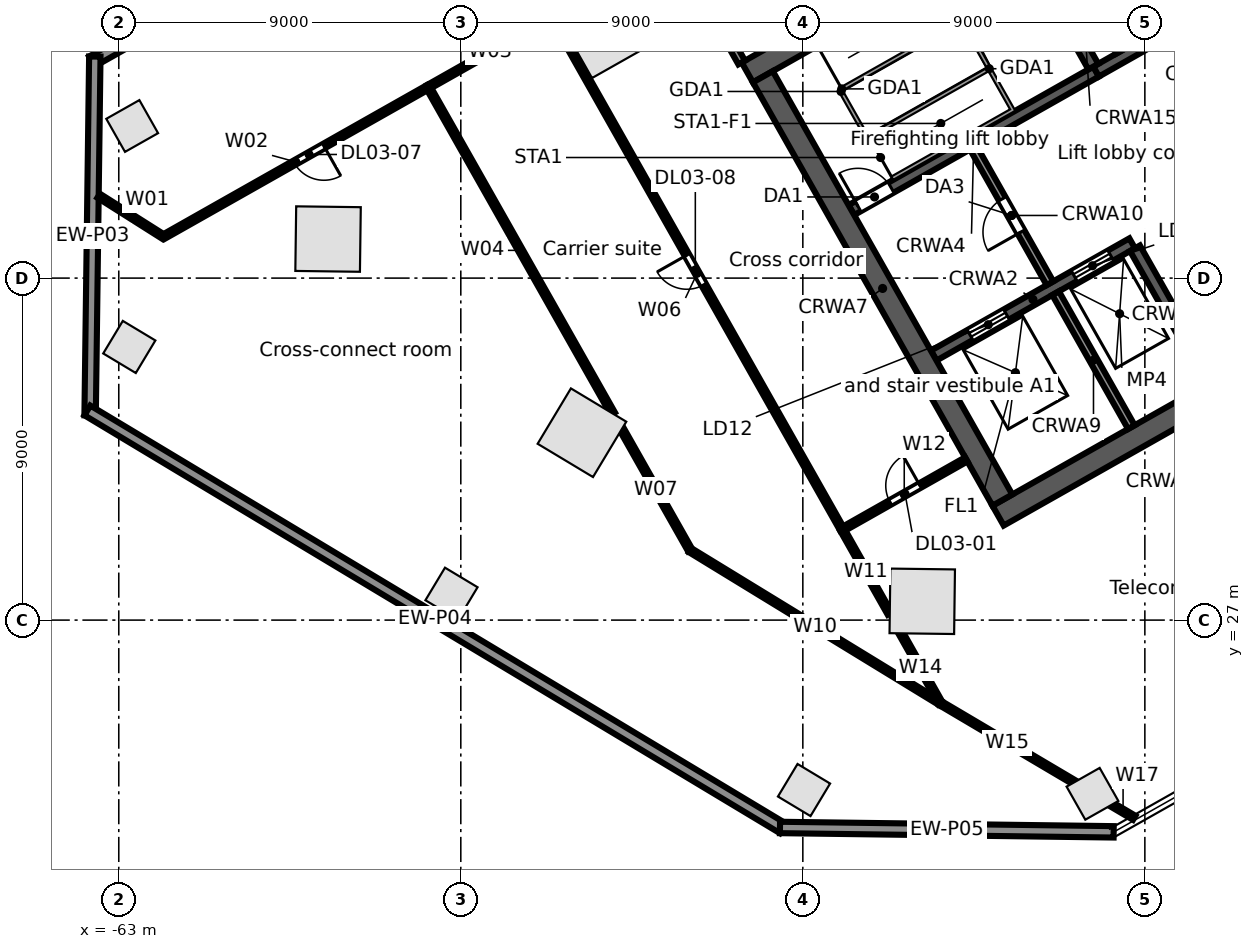
"""IFC4 building model, lengths in metres.
Left out: names, types, materials, properties, quantities, classifications, styles, units other than length and angle.
Written with IfcOpenShell. Run it as: python <this file> out.ifc"""

import sys

from ifc_helpers import new_model, si_unit, direction, frame, frame_2d, origin, origin_2d, place, context, subcontext, project, spatial, rectangle, extrude, element, fill, save


model = new_model("IFC4")
c1 = context("Model", 3, precision=1e-05, world=origin(), true_north=direction((0.0, 1.0)))
c2 = subcontext(c1, "Body", "Model", "MODEL_VIEW")
j1 = project(units=[si_unit("LENGTHUNIT", "METRE"), si_unit("PLANEANGLEUNIT", "RADIAN")], contexts=[c1])
p1 = place(None, origin())
s1 = spatial("IfcSite", under=j1, at=p1, CompositionType="ELEMENT")
p2 = place(p1, origin())
s2 = spatial("IfcBuilding", under=s1, at=p2, CompositionType="ELEMENT")
p3 = place(p2, frame((0.0, 0.0, 16.5)))
s3 = spatial("IfcBuildingStorey", under=s2, at=p3, CompositionType="ELEMENT", Elevation=16.5)
for number, where, z_axis, x_axis in (
    (1, (-50.226, 42.423, 0.0), (0.0, 0.0, 1.0), (-0.87, -0.492, 0.0)),
    (2, (-57.493, 37.027, 0.0), (0.0, 0.0, 1.0), (-0.013, -1.0, 0.0)),
    (3, (-50.812, 31.931, 0.0), (0.0, 0.0, 1.0), (0.857, -0.515, 0.0)),
    (4, (-41.858, 27.495, 0.0), (0.0, 0.0, 1.0), (1.0, -0.013, 0.0)),
):
    element("IfcColumn", number, at=place(p3, frame(where, z_axis=z_axis, x_axis=x_axis)), inside=s3, PredefinedType="COLUMN", context=c2, shape_type="SweptSolid", body=[
        extrude(rectangle(XDim=1.7, YDim=1.7, at=origin_2d()), origin(), (0.0, 0.0, 1.0), 5.0),
    ])
for number, where, z_axis, x_axis in (
    (5, (-62.647, 40.003, 0.0), (0.0, 0.0, 1.0), (-0.87, -0.492, 0.0)),
    (6, (-62.723, 34.188, 0.0), (0.0, 0.0, 1.0), (0.857, -0.515, 0.0)),
    (7, (-54.245, 27.694, 0.0), (0.0, 0.0, 1.0), (0.857, -0.515, 0.0)),
    (8, (-44.969, 22.528, 0.0), (0.0, 0.0, 1.0), (0.857, -0.515, 0.0)),
    (9, (-37.378, 22.429, 0.0), (0.0, 0.0, 1.0), (0.87, 0.492, 0.0)),
):
    element("IfcColumn", number, at=place(p3, frame(where, z_axis=z_axis, x_axis=x_axis)), inside=s3, PredefinedType="COLUMN", context=c2, shape_type="SweptSolid", body=[
        extrude(rectangle(XDim=1.0, YDim=1.0, at=origin_2d()), origin(), (0.0, 0.0, 1.0), 5.0),
    ])
p4 = place(p3, frame((-63.707, 41.701, 0.0), z_axis=(0.0, 0.0, 1.0), x_axis=(0.870355510268, 0.492423888277, 0.0)))
e10 = element("IfcWall", 10, at=p4, inside=s3, PredefinedType="STANDARD", context=c2, shape_type="SweptSolid", body=[
    extrude(rectangle(XDim=67.903, YDim=0.3, at=frame_2d((33.952, 0.0))), origin(), (0.0, 0.0, 1.0), 4.65),
])
p5 = place(p3, frame((-63.754, 32.387, 0.0), z_axis=(0.0, 0.0, 1.0), x_axis=(0.013081929375, 0.999914427901, 0.0)))
e11 = element("IfcWall", 11, at=p5, inside=s3, PredefinedType="STANDARD", context=c2, shape_type="SweptSolid", body=[
    extrude(rectangle(XDim=9.443, YDim=0.3, at=frame_2d((4.722, 0.0))), origin(), (0.0, 0.0, 1.0), 4.65),
])
p6 = place(p3, frame((-45.526, 21.522, 0.0), z_axis=(0.0, 0.0, 1.0), x_axis=(-0.857164837164, 0.515042174903, 0.0)))
e12 = element("IfcWall", 12, at=p6, inside=s3, PredefinedType="STANDARD", context=c2, shape_type="SweptSolid", body=[
    extrude(rectangle(XDim=21.35, YDim=0.3, at=frame_2d((10.675, 0.0))), origin(), (0.0, 0.0, 1.0), 4.65),
])
p7 = place(p3, frame((-36.821, 21.428, 0.0), z_axis=(0.0, 0.0, 1.0), x_axis=(-0.999914252794, 0.013095306781, 0.0)))
e13 = element("IfcWall", 13, at=p7, inside=s3, PredefinedType="STANDARD", context=c2, shape_type="SweptSolid", body=[
    extrude(rectangle(XDim=8.781, YDim=0.3, at=frame_2d((4.391, 0.0))), origin(), (0.0, 0.0, 1.0), 4.65),
])
p8 = place(p3, frame((-39.862, 29.749, 0.0), z_axis=(0.0, 0.0, 1.0), x_axis=(0.870350116061, 0.492433422375, 0.0)))
e14 = element("IfcWall", 14, at=p8, inside=s3, PredefinedType="SOLIDWALL", context=c2, shape_type="SweptSolid", body=[
    extrude(rectangle(XDim=17.0, YDim=0.6, at=frame_2d((8.5, 0.0))), origin(), (0.0, 0.0, 1.0), 4.65),
])
p9 = place(p8, frame((7.2, 0.0, 0.0)))
e15 = element("IfcOpeningElement", 15, at=p9, cuts=e14, PredefinedType="OPENING", context=c2, shape_type="SweptSolid", body=[
    extrude(rectangle(XDim=1.2, YDim=2.1, at=frame_2d((0.6, 1.05))), frame((0.0, 0.31, 0.0), z_axis=(0.0, -1.0, 0.0), x_axis=(1.0, 0.0, 0.0)), (0.0, 0.0, 1.0), 0.62),
])
p10 = place(p3, frame((-41.556, 33.961, 0.0), z_axis=(0.0, 0.0, 1.0), x_axis=(0.870343731308, 0.492444706919, 0.0)))
e16 = element("IfcWall", 16, at=p10, inside=s3, PredefinedType="SOLIDWALL", context=c2, shape_type="SweptSolid", body=[
    extrude(rectangle(XDim=6.0, YDim=0.3, at=frame_2d((3.0, 0.0))), origin(), (0.0, 0.0, 1.0), 4.65),
])
p11 = place(p10, frame((1.1, 0.0, 0.0)))
e17 = element("IfcOpeningElement", 17, at=p11, cuts=e16, PredefinedType="OPENING", context=c2, shape_type="SweptSolid", body=[
    extrude(rectangle(XDim=1.1, YDim=2.1, at=frame_2d((0.55, 1.05))), frame((0.0, 0.16, 0.0), z_axis=(0.0, -1.0, 0.0), x_axis=(1.0, 0.0, 0.0)), (0.0, 0.0, 1.0), 0.32),
])
p12 = place(p10, frame((4.25, 0.0, 0.0)))
e18 = element("IfcOpeningElement", 18, at=p12, cuts=e16, PredefinedType="OPENING", context=c2, shape_type="SweptSolid", body=[
    extrude(rectangle(XDim=1.1, YDim=2.1, at=frame_2d((0.55, 1.05))), frame((0.0, 0.16, 0.0), z_axis=(0.0, -1.0, 0.0), x_axis=(1.0, 0.0, 0.0)), (0.0, 0.0, 1.0), 0.32),
])
p13 = place(p3, frame((-43.723, 37.791, 0.0), z_axis=(0.0, 0.0, 1.0), x_axis=(0.87035077051, 0.49243226567, 0.0)))
e19 = element("IfcWall", 19, at=p13, inside=s3, PredefinedType="SOLIDWALL", context=c2, shape_type="SweptSolid", body=[
    extrude(rectangle(XDim=7.4, YDim=0.3, at=frame_2d((3.7, 0.0))), origin(), (0.0, 0.0, 1.0), 4.65),
])
p14 = place(p13, frame((0.2, 0.0, 0.0)))
e20 = element("IfcOpeningElement", 20, at=p14, cuts=e19, PredefinedType="OPENING", context=c2, shape_type="SweptSolid", body=[
    extrude(rectangle(XDim=1.0, YDim=2.1, at=frame_2d((0.5, 1.05))), frame((0.0, 0.16, 0.0), z_axis=(0.0, -1.0, 0.0), x_axis=(1.0, 0.0, 0.0)), (0.0, 0.0, 1.0), 0.32),
])
p15 = place(p3, frame((-37.282, 41.435, 0.0), z_axis=(0.0, 0.0, 1.0), x_axis=(0.870356516133, 0.492422110414, 0.0)))
e21 = element("IfcWall", 21, at=p15, inside=s3, PredefinedType="SOLIDWALL", context=c2, shape_type="SweptSolid", body=[
    extrude(rectangle(XDim=8.4, YDim=0.3, at=frame_2d((4.2, 0.0))), origin(), (0.0, 0.0, 1.0), 4.65),
])
p16 = place(p15, frame((6.2, 0.0, 0.0)))
e22 = element("IfcOpeningElement", 22, at=p16, cuts=e21, PredefinedType="OPENING", context=c2, shape_type="SweptSolid", body=[
    extrude(rectangle(XDim=1.1, YDim=2.1, at=frame_2d((0.55, 1.05))), frame((0.0, 0.16, 0.0), z_axis=(0.0, -1.0, 0.0), x_axis=(1.0, 0.0, 0.0)), (0.0, 0.0, 1.0), 0.32),
])
p17 = place(p15, frame((2.35, 0.0, 0.0)))
e23 = element("IfcOpeningElement", 23, at=p17, cuts=e21, PredefinedType="OPENING", context=c2, shape_type="SweptSolid", body=[
    extrude(rectangle(XDim=0.9, YDim=2.1, at=frame_2d((0.45, 1.05))), frame((0.0, 0.16, 0.0), z_axis=(0.0, -1.0, 0.0), x_axis=(1.0, 0.0, 0.0)), (0.0, 0.0, 1.0), 0.32),
])
p18 = place(p3, frame((-46.461, 41.412, 0.0), z_axis=(0.0, 0.0, 1.0), x_axis=(0.870350116061, 0.492433422375, 0.0)))
e24 = element("IfcWall", 24, at=p18, inside=s3, PredefinedType="SOLIDWALL", context=c2, shape_type="SweptSolid", body=[
    extrude(rectangle(XDim=17.0, YDim=0.6, at=frame_2d((8.5, 0.0))), origin(), (0.0, 0.0, 1.0), 4.65),
])
p19 = place(p3, frame((-46.052, 41.298, 0.0), z_axis=(0.0, 0.0, 1.0), x_axis=(0.492418598281, -0.870358503186, 0.0)))
e25 = element("IfcWall", 25, at=p19, inside=s3, PredefinedType="SOLIDWALL", context=c2, shape_type="SweptSolid", body=[
    extrude(rectangle(XDim=12.8, YDim=0.6, at=frame_2d((6.4, 0.0))), origin(), (0.0, 0.0, 1.0), 4.65),
])
p20 = place(p3, frame((-38.349, 35.603, 0.0), z_axis=(0.0, 0.0, 1.0), x_axis=(0.49241474071, -0.870360685654, 0.0)))
e26 = element("IfcWall", 26, at=p20, inside=s3, PredefinedType="SOLIDWALL", context=c2, shape_type="SweptSolid", body=[
    extrude(rectangle(XDim=4.05, YDim=0.2, at=frame_2d((2.025, 0.0))), origin(), (0.0, 0.0, 1.0), 4.65),
])
p21 = place(p3, frame((-40.516, 39.433, 0.0), z_axis=(0.0, 0.0, 1.0), x_axis=(0.492453559952, -0.87033872216, 0.0)))
e27 = element("IfcWall", 27, at=p21, inside=s3, PredefinedType="PARTITIONING", context=c2, shape_type="SweptSolid", body=[
    extrude(rectangle(XDim=4.1, YDim=0.2, at=frame_2d((2.05, 0.0))), origin(), (0.0, 0.0, 1.0), 4.65),
])
p22 = place(p21, frame((1.55, 0.0, 0.0)))
e28 = element("IfcOpeningElement", 28, at=p22, cuts=e27, PredefinedType="OPENING", context=c2, shape_type="SweptSolid", body=[
    extrude(rectangle(XDim=1.0, YDim=2.1, at=frame_2d((0.5, 1.05))), frame((0.0, 0.11, 0.0), z_axis=(0.0, -1.0, 0.0), x_axis=(1.0, 0.0, 0.0)), (0.0, 0.0, 1.0), 0.22),
])
p23 = place(p3, frame((-36.26, 36.785, 0.0), z_axis=(0.0, 0.0, 1.0), x_axis=(0.492440575896, -0.870346068648, 0.0)))
e29 = element("IfcWall", 29, at=p23, inside=s3, PredefinedType="SOLIDWALL", context=c2, shape_type="SweptSolid", body=[
    extrude(rectangle(XDim=4.05, YDim=0.3, at=frame_2d((2.025, 0.0))), origin(), (0.0, 0.0, 1.0), 4.65),
])
p24 = place(p3, frame((-39.35, 45.09, 0.0), z_axis=(0.0, 0.0, 1.0), x_axis=(0.49241474071, -0.870360685654, 0.0)))
e30 = element("IfcWall", 30, at=p24, inside=s3, PredefinedType="SOLIDWALL", context=c2, shape_type="SweptSolid", body=[
    extrude(rectangle(XDim=4.05, YDim=0.3, at=frame_2d((2.025, 0.0))), origin(), (0.0, 0.0, 1.0), 4.65),
])
p25 = place(p3, frame((-38.654, 45.484, 0.0), z_axis=(0.0, 0.0, 1.0), x_axis=(0.492440575896, -0.870346068648, 0.0)))
e31 = element("IfcWall", 31, at=p25, inside=s3, PredefinedType="SOLIDWALL", context=c2, shape_type="SweptSolid", body=[
    extrude(rectangle(XDim=4.05, YDim=0.2, at=frame_2d((2.025, 0.0))), origin(), (0.0, 0.0, 1.0), 4.65),
])
p26 = place(p3, frame((-63.529, 38.167, 0.0), z_axis=(0.0, 0.0, 1.0), x_axis=(0.844913795328, -0.534902494352, 0.0)))
e32 = element("IfcWall", 32, at=p26, inside=s3, PredefinedType="PARTITIONING", context=c2, shape_type="SweptSolid", body=[
    extrude(rectangle(XDim=2.019, YDim=0.125, at=frame_2d((1.01, 0.0))), origin(), (0.0, 0.0, 1.0), 4.13),
])
p27 = place(p3, frame((-61.823, 37.087, 0.0), z_axis=(0.0, 0.0, 1.0), x_axis=(0.870379756599, 0.492381030609, 0.0)))
e33 = element("IfcWall", 33, at=p27, inside=s3, PredefinedType="PARTITIONING", context=c2, shape_type="SweptSolid", body=[
    extrude(rectangle(XDim=8.0, YDim=0.125, at=frame_2d((4.0, 0.0))), origin(), (0.0, 0.0, 1.0), 3.83),
])
p28 = place(p27, frame((3.95, 0.0, 0.0)))
e34 = element("IfcOpeningElement", 34, at=p28, cuts=e33, PredefinedType="OPENING", context=c2, shape_type="SweptSolid", body=[
    extrude(rectangle(XDim=0.9, YDim=2.1, at=frame_2d((0.45, 1.05))), frame((0.0, 0.073, 0.0), z_axis=(0.0, -1.0, 0.0), x_axis=(1.0, 0.0, 0.0)), (0.0, 0.0, 1.0), 0.145),
])
p29 = place(p3, frame((-54.86, 41.026, 0.0), z_axis=(0.0, 0.0, 1.0), x_axis=(0.870310553999, 0.492503339682, 0.0)))
e35 = element("IfcWall", 35, at=p29, inside=s3, PredefinedType="PARTITIONING", context=c2, shape_type="SweptSolid", body=[
    extrude(rectangle(XDim=3.75, YDim=0.125, at=frame_2d((1.875, 0.0))), origin(), (0.0, 0.0, 1.0), 4.024),
])
p30 = place(p3, frame((-54.86, 41.026, 0.0), z_axis=(0.0, 0.0, 1.0), x_axis=(0.492429637412, -0.870352257536, 0.0)))
e36 = element("IfcWall", 36, at=p30, inside=s3, PredefinedType="PARTITIONING", context=c2, shape_type="SweptSolid", body=[
    extrude(rectangle(XDim=9.872, YDim=0.125, at=frame_2d((4.936, 0.0))), origin(), (0.0, 0.0, 1.0), 3.712),
])
p31 = place(p3, frame((-51.596, 42.873, 0.0), z_axis=(0.0, 0.0, 1.0), x_axis=(0.492435038471, -0.870349201692, 0.0)))
e37 = element("IfcWall", 37, at=p31, inside=s3, PredefinedType="PARTITIONING", context=c2, shape_type="SweptSolid", body=[
    extrude(rectangle(XDim=15.501, YDim=0.125, at=frame_2d((7.75, 0.0))), origin(), (0.0, 0.0, 1.0), 3.712),
])
p32 = place(p31, frame((7.2, 0.0, 0.0)))
e38 = element("IfcOpeningElement", 38, at=p32, cuts=e37, PredefinedType="OPENING", context=c2, shape_type="SweptSolid", body=[
    extrude(rectangle(XDim=0.9, YDim=2.1, at=frame_2d((0.45, 1.05))), frame((0.0, 0.073, 0.0), z_axis=(0.0, -1.0, 0.0), x_axis=(1.0, 0.0, 0.0)), (0.0, 0.0, 1.0), 0.145),
])
p33 = place(p3, frame((-49.766, 32.022, 0.0), z_axis=(0.0, 0.0, 1.0), x_axis=(0.492501810842, -0.870311419159, 0.0)))
e39 = element("IfcWall", 39, at=p33, inside=s3, PredefinedType="PARTITIONING", context=c2, shape_type="SweptSolid", body=[
    extrude(rectangle(XDim=3.655, YDim=0.125, at=frame_2d((1.828, 0.0))), origin(), (0.0, 0.0, 1.0), 3.93),
])
p34 = place(p3, frame((-48.332, 44.719, 0.0), z_axis=(0.0, 0.0, 1.0), x_axis=(0.492392845909, -0.87037307248, 0.0)))
e40 = element("IfcWall", 40, at=p34, inside=s3, PredefinedType="PARTITIONING", context=c2, shape_type="SweptSolid", body=[
    extrude(rectangle(XDim=3.5, YDim=0.2, at=frame_2d((1.75, 0.0))), origin(), (0.0, 0.0, 1.0), 3.93),
])
p35 = place(p3, frame((-47.966, 28.841, 0.0), z_axis=(0.0, 0.0, 1.0), x_axis=(0.8531669284, -0.521637989686, 0.0)))
e41 = element("IfcWall", 41, at=p35, inside=s3, PredefinedType="PARTITIONING", context=c2, shape_type="SweptSolid", body=[
    extrude(rectangle(XDim=7.722, YDim=0.125, at=frame_2d((3.861, 0.0))), origin(), (0.0, 0.0, 1.0), 3.93),
])
p36 = place(p3, frame((-43.963, 29.382, 0.0), z_axis=(0.0, 0.0, 1.0), x_axis=(0.492408705769, -0.870364099951, 0.0)))
e42 = element("IfcWall", 42, at=p36, inside=s3, PredefinedType="PARTITIONING", context=c2, shape_type="SweptSolid", body=[
    extrude(rectangle(XDim=2.541, YDim=0.125, at=frame_2d((1.27, 0.0))), origin(), (0.0, 0.0, 1.0), 3.93),
])
p37 = place(p3, frame((-43.963, 29.382, 0.0), z_axis=(0.0, 0.0, 1.0), x_axis=(0.870259488443, 0.492593567533, 0.0)))
e43 = element("IfcWall", 43, at=p37, inside=s3, PredefinedType="PARTITIONING", context=c2, shape_type="SweptSolid", body=[
    extrude(rectangle(XDim=3.749, YDim=0.125, at=frame_2d((1.875, 0.0))), origin(), (0.0, 0.0, 1.0), 4.024),
])
p38 = place(p37, frame((1.45, 0.0, 0.0)))
e44 = element("IfcOpeningElement", 44, at=p38, cuts=e43, PredefinedType="OPENING", context=c2, shape_type="SweptSolid", body=[
    extrude(rectangle(XDim=0.9, YDim=2.1, at=frame_2d((0.45, 1.05))), frame((0.0, 0.073, 0.0), z_axis=(0.0, -1.0, 0.0), x_axis=(1.0, 0.0, 0.0)), (0.0, 0.0, 1.0), 0.145),
])
p39 = place(p3, frame((-42.418, 26.652, 0.0), z_axis=(0.0, 0.0, 1.0), x_axis=(0.492251431349, -0.870453059237, 0.0)))
e45 = element("IfcWall", 45, at=p39, inside=s3, PredefinedType="PARTITIONING", context=c2, shape_type="SweptSolid", body=[
    extrude(rectangle(XDim=2.113, YDim=0.125, at=frame_2d((1.056, 0.0))), origin(), (0.0, 0.0, 1.0), 4.65),
])
p40 = place(p3, frame((-41.378, 24.813, 0.0), z_axis=(0.0, 0.0, 1.0), x_axis=(0.860752907168, -0.509023017948, 0.0)))
e46 = element("IfcWall", 46, at=p40, inside=s3, PredefinedType="PARTITIONING", context=c2, shape_type="SweptSolid", body=[
    extrude(rectangle(XDim=4.088, YDim=0.125, at=frame_2d((2.044, 0.0))), origin(), (0.0, 0.0, 1.0), 4.65),
])
p41 = place(p3, frame((-36.866, 22.144, 0.0), z_axis=(0.0, 0.0, 1.0), x_axis=(0.861112187998, -0.508414987664, 0.0)))
e47 = element("IfcWall", 47, at=p41, inside=s3, PredefinedType="PARTITIONING", context=c2, shape_type="SweptSolid", body=[
    extrude(rectangle(XDim=0.68, YDim=0.125, at=frame_2d((0.34, 0.0))), origin(), (0.0, 0.0, 1.0), 4.65),
])
p42 = place(p11, origin())
e48 = element("IfcDoor", 48, at=p42, inside=s3, OperationType="DOUBLE_DOOR_SLIDING", PredefinedType="DOOR", context=c2, shape_type="SweptSolid", body=[
    extrude(rectangle(XDim=1.1, YDim=2.1, at=frame_2d((0.55, 1.05))), frame((0.0, 0.025, 0.0), z_axis=(0.0, -1.0, 0.0), x_axis=(1.0, 0.0, 0.0)), (0.0, 0.0, 1.0), 0.05),
])
fill(e17, e48)
p43 = place(p12, origin())
e49 = element("IfcDoor", 49, at=p43, inside=s3, OperationType="DOUBLE_DOOR_SLIDING", PredefinedType="DOOR", context=c2, shape_type="SweptSolid", body=[
    extrude(rectangle(XDim=1.1, YDim=2.1, at=frame_2d((0.55, 1.05))), frame((0.0, 0.025, 0.0), z_axis=(0.0, -1.0, 0.0), x_axis=(1.0, 0.0, 0.0)), (0.0, 0.0, 1.0), 0.05),
])
fill(e18, e49)
p44 = place(p14, origin())
e50 = element("IfcDoor", 50, at=p44, inside=s3, OperationType="SINGLE_SWING_LEFT", PredefinedType="DOOR", context=c2, shape_type="SweptSolid", body=[
    extrude(rectangle(XDim=1.0, YDim=2.1, at=frame_2d((0.5, 1.05))), frame((0.0, 0.025, 0.0), z_axis=(0.0, -1.0, 0.0), x_axis=(1.0, 0.0, 0.0)), (0.0, 0.0, 1.0), 0.05),
])
fill(e20, e50)
p45 = place(p22, frame((1.0, 0.0, 0.0), z_axis=(0.0, 0.0, 1.0), x_axis=(-1.0, 0.0, 0.0)))
e51 = element("IfcDoor", 51, at=p45, inside=s3, OperationType="SINGLE_SWING_LEFT", PredefinedType="DOOR", context=c2, shape_type="SweptSolid", body=[
    extrude(rectangle(XDim=1.0, YDim=2.1, at=frame_2d((0.5, 1.05))), frame((0.0, 0.025, 0.0), z_axis=(0.0, -1.0, 0.0), x_axis=(1.0, 0.0, 0.0)), (0.0, 0.0, 1.0), 0.05),
])
fill(e28, e51)
p46 = place(p38, origin())
e52 = element("IfcDoor", 52, at=p46, inside=s3, OperationType="SINGLE_SWING_RIGHT", PredefinedType="DOOR", context=c2, shape_type="SweptSolid", body=[
    extrude(rectangle(XDim=0.9, YDim=2.1, at=frame_2d((0.45, 1.05))), frame((0.0, 0.025, 0.0), z_axis=(0.0, -1.0, 0.0), x_axis=(1.0, 0.0, 0.0)), (0.0, 0.0, 1.0), 0.05),
])
fill(e44, e52)
p47 = place(p28, frame((0.9, 0.0, 0.0), z_axis=(0.0, 0.0, 1.0), x_axis=(-1.0, 0.0, 0.0)))
e53 = element("IfcDoor", 53, at=p47, inside=s3, OperationType="SINGLE_SWING_LEFT", PredefinedType="DOOR", context=c2, shape_type="SweptSolid", body=[
    extrude(rectangle(XDim=0.9, YDim=2.1, at=frame_2d((0.45, 1.05))), frame((0.0, 0.025, 0.0), z_axis=(0.0, -1.0, 0.0), x_axis=(1.0, 0.0, 0.0)), (0.0, 0.0, 1.0), 0.05),
])
fill(e34, e53)
p48 = place(p32, frame((0.9, 0.0, 0.0), z_axis=(0.0, 0.0, 1.0), x_axis=(-1.0, 0.0, 0.0)))
e54 = element("IfcDoor", 54, at=p48, inside=s3, OperationType="SINGLE_SWING_RIGHT", PredefinedType="DOOR", context=c2, shape_type="SweptSolid", body=[
    extrude(rectangle(XDim=0.9, YDim=2.1, at=frame_2d((0.45, 1.05))), frame((0.0, 0.025, 0.0), z_axis=(0.0, -1.0, 0.0), x_axis=(1.0, 0.0, 0.0)), (0.0, 0.0, 1.0), 0.05),
])
fill(e38, e54)
save(model, sys.argv[1])
